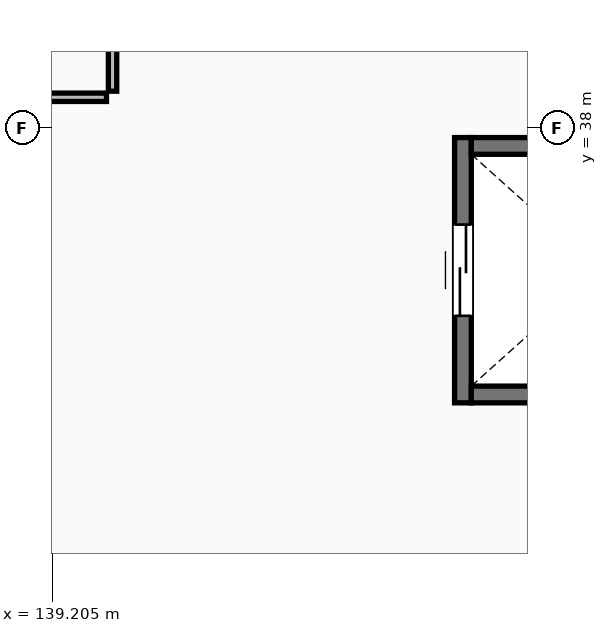
"""IFC4 building model, lengths in metres.
Left out: names, types, materials, properties, quantities, classifications, styles, units other than length and angle.
Written with IfcOpenShell. Run it as: python <this file> out.ifc"""

import sys

from ifc_helpers import new_model, si_unit, direction, frame, frame_2d, origin, place, context, subcontext, project, spatial, rectangle, extrude, element, fill, save


model = new_model("IFC4")
c1 = context("Model", 3, precision=1e-05, world=origin(), true_north=direction((0.0, 1.0)))
c2 = subcontext(c1, "Body", "Model", "MODEL_VIEW")
j1 = project(units=[si_unit("LENGTHUNIT", "METRE"), si_unit("PLANEANGLEUNIT", "RADIAN")], contexts=[c1])
p1 = place(None, origin())
s1 = spatial("IfcSite", under=j1, at=p1, CompositionType="ELEMENT")
p2 = place(p1, origin())
s2 = spatial("IfcBuilding", under=s1, at=p2, CompositionType="ELEMENT")
p3 = place(p2, frame((0.0, 0.0, 4.5)))
s3 = spatial("IfcBuildingStorey", under=s2, at=p3, CompositionType="ELEMENT", Elevation=4.5)
p4 = place(p3, frame((144.61, 34.38, 0.0), z_axis=(0.0, 0.0, 1.0), x_axis=(0.0, 1.0, 0.0)))
e1 = element("IfcWall", 1, at=p4, inside=s3, PredefinedType="SHEAR", context=c2, shape_type="SweptSolid", body=[
    extrude(rectangle(XDim=3.49, YDim=0.22, at=frame_2d((1.745, 0.0))), origin(), (0.0, 0.0, 1.0), 3.9),
])
p5 = place(p4, frame((1.145, 0.0, 0.0)))
e2 = element("IfcOpeningElement", 2, at=p5, cuts=e1, PredefinedType="OPENING", context=c2, shape_type="SweptSolid", body=[
    extrude(rectangle(XDim=1.2, YDim=2.2, at=frame_2d((0.6, 1.1))), frame((0.0, 0.12, 0.0), z_axis=(0.0, -1.0, 0.0), x_axis=(1.0, 0.0, 0.0)), (0.0, 0.0, 1.0), 0.24),
])
for number, where, z_axis, x_axis in (
    (3, (148.12, 34.49, 0.0), (0.0, 0.0, 1.0), (-1.0, 0.0, 0.0)),
    (4, (144.72, 37.76, 0.0), (0.0, 0.0, 1.0), (1.0, 0.0, 0.0)),
):
    element("IfcWall", number, at=place(p3, frame(where, z_axis=z_axis, x_axis=x_axis)), inside=s3, PredefinedType="SHEAR", context=c2, shape_type="SweptSolid", body=[
        extrude(rectangle(XDim=3.4, YDim=0.22, at=frame_2d((1.7, 0.0))), origin(), (0.0, 0.0, 1.0), 3.9),
    ])
p6 = place(p3, frame((132.08, 38.4, 0.0), z_axis=(0.0, 0.0, 1.0), x_axis=(1.0, 0.0, 0.0)))
e5 = element("IfcWall", 5, at=p6, inside=s3, PredefinedType="PARTITIONING", context=c2, shape_type="SweptSolid", body=[
    extrude(rectangle(XDim=7.84, YDim=0.11, at=frame_2d((3.92, 0.0))), origin(), (0.0, 0.0, 1.0), 3.645),
])
p7 = place(p3, frame((140.0, 38.48, 0.0), z_axis=(0.0, 0.0, 1.0), x_axis=(0.0, 1.0, 0.0)))
e6 = element("IfcWall", 6, at=p7, inside=s3, PredefinedType="PARTITIONING", context=c2, shape_type="SweptSolid", body=[
    extrude(rectangle(XDim=13.44, YDim=0.11, at=frame_2d((6.72, 0.0))), origin(), (0.0, 0.0, 1.0), 2.695),
])
p8 = place(p5, origin())
e7 = element("IfcDoor", 7, at=p8, inside=s3, OperationType="DOUBLE_DOOR_SLIDING", PredefinedType="DOOR", context=c2, shape_type="SweptSolid", body=[
    extrude(rectangle(XDim=1.2, YDim=2.2, at=frame_2d((0.6, 1.1))), frame((0.0, 0.025, 0.0), z_axis=(0.0, -1.0, 0.0), x_axis=(1.0, 0.0, 0.0)), (0.0, 0.0, 1.0), 0.05),
])
fill(e2, e7)
save(model, sys.argv[1])
